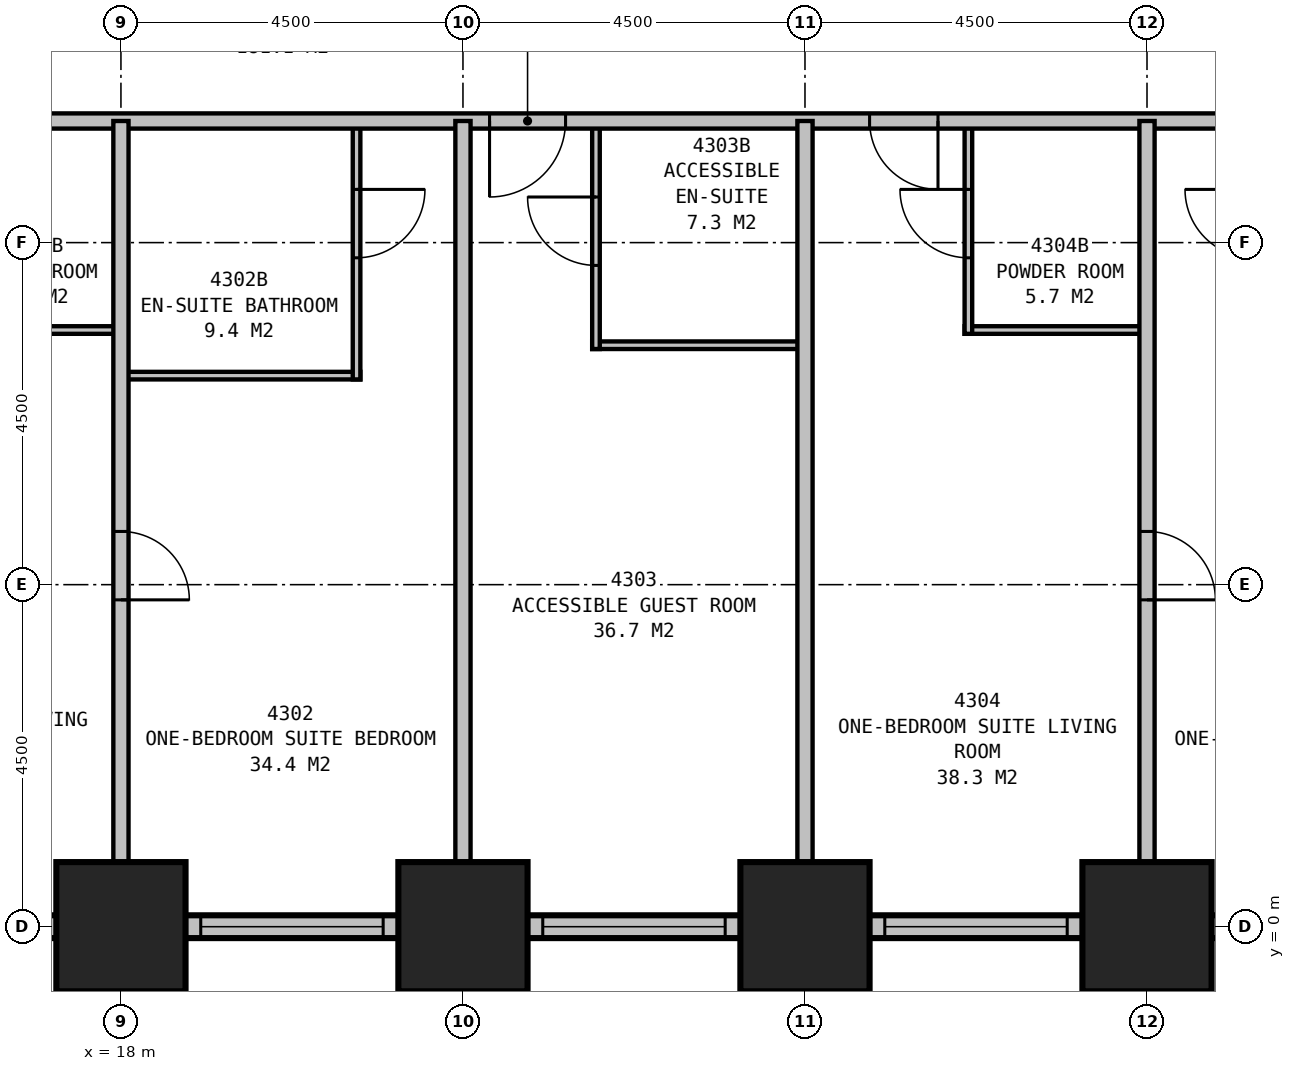
"""IFC4 building model, lengths in metres.
Left out: names, types, materials, properties, quantities, classifications, styles, units other than length and angle.
Written with IfcOpenShell. Run it as: python <this file> out.ifc"""

import sys

from ifc_helpers import new_model, si_unit, direction, frame, frame_2d, origin, origin_2d, place, context, subcontext, project, spatial, rectangle, extrude, element, fill, save


model = new_model("IFC4")
c1 = context("Model", 3, precision=1e-05, world=origin(), true_north=direction((0.0, 1.0)))
c2 = subcontext(c1, "Body", "Model", "MODEL_VIEW")
j1 = project(units=[si_unit("LENGTHUNIT", "METRE"), si_unit("PLANEANGLEUNIT", "RADIAN")], contexts=[c1])
p1 = place(None, origin())
s1 = spatial("IfcSite", under=j1, at=p1, CompositionType="ELEMENT")
p2 = place(p1, origin())
s2 = spatial("IfcBuilding", under=s1, at=p2, CompositionType="ELEMENT")
p3 = place(p2, frame((0.0, 0.0, 169.4)))
s3 = spatial("IfcBuildingStorey", under=s2, at=p3, CompositionType="ELEMENT", Elevation=169.4)
for number, where, z_axis, x_axis in (
    (1, (18.0, 0.0, 0.0), (0.0, 0.0, 1.0), (1.0, 0.0, 0.0)),
    (2, (22.5, 0.0, 0.0), (0.0, 0.0, 1.0), (1.0, 0.0, 0.0)),
    (3, (27.0, 0.0, 0.0), (0.0, 0.0, 1.0), (1.0, 0.0, 0.0)),
    (4, (31.5, 0.0, 0.0), (0.0, 0.0, 1.0), (1.0, 0.0, 0.0)),
):
    element("IfcColumn", number, at=place(p3, frame(where, z_axis=z_axis, x_axis=x_axis)), inside=s3, PredefinedType="COLUMN", context=c2, shape_type="SweptSolid", body=[
        extrude(rectangle(XDim=1.7, YDim=1.7, at=origin_2d()), origin(), (0.0, 0.0, 1.0), 3.5),
    ])
p4 = place(p3, frame((8.85, 0.0, 0.0), z_axis=(0.0, 0.0, 1.0), x_axis=(1.0, 0.0, 0.0)))
e5 = element("IfcWall", 5, at=p4, inside=s3, PredefinedType="STANDARD", context=c2, shape_type="SweptSolid", body=[
    extrude(rectangle(XDim=36.3, YDim=0.3, at=frame_2d((18.15, 0.0))), origin(), (0.0, 0.0, 1.0), 2.25),
])
p5 = place(p4, frame((1.2, 0.0, 0.5)))
e6 = element("IfcOpeningElement", 6, at=p5, cuts=e5, PredefinedType="OPENING", context=c2, shape_type="SweptSolid", body=[
    extrude(rectangle(XDim=2.4, YDim=1.6, at=frame_2d((1.2, 0.8))), frame((0.0, 0.16, 0.0), z_axis=(0.0, -1.0, 0.0), x_axis=(1.0, 0.0, 0.0)), (0.0, 0.0, 1.0), 0.32),
])
p6 = place(p4, frame((5.7, 0.0, 0.5)))
e7 = element("IfcOpeningElement", 7, at=p6, cuts=e5, PredefinedType="OPENING", context=c2, shape_type="SweptSolid", body=[
    extrude(rectangle(XDim=2.4, YDim=1.6, at=frame_2d((1.2, 0.8))), frame((0.0, 0.16, 0.0), z_axis=(0.0, -1.0, 0.0), x_axis=(1.0, 0.0, 0.0)), (0.0, 0.0, 1.0), 0.32),
])
p7 = place(p4, frame((10.2, 0.0, 0.5)))
e8 = element("IfcOpeningElement", 8, at=p7, cuts=e5, PredefinedType="OPENING", context=c2, shape_type="SweptSolid", body=[
    extrude(rectangle(XDim=2.4, YDim=1.6, at=frame_2d((1.2, 0.8))), frame((0.0, 0.16, 0.0), z_axis=(0.0, -1.0, 0.0), x_axis=(1.0, 0.0, 0.0)), (0.0, 0.0, 1.0), 0.32),
])
p8 = place(p4, frame((14.7, 0.0, 0.5)))
e9 = element("IfcOpeningElement", 9, at=p8, cuts=e5, PredefinedType="OPENING", context=c2, shape_type="SweptSolid", body=[
    extrude(rectangle(XDim=2.4, YDim=1.6, at=frame_2d((1.2, 0.8))), frame((0.0, 0.16, 0.0), z_axis=(0.0, -1.0, 0.0), x_axis=(1.0, 0.0, 0.0)), (0.0, 0.0, 1.0), 0.32),
])
p9 = place(p4, frame((19.2, 0.0, 0.5)))
e10 = element("IfcOpeningElement", 10, at=p9, cuts=e5, PredefinedType="OPENING", context=c2, shape_type="SweptSolid", body=[
    extrude(rectangle(XDim=2.4, YDim=1.6, at=frame_2d((1.2, 0.8))), frame((0.0, 0.16, 0.0), z_axis=(0.0, -1.0, 0.0), x_axis=(1.0, 0.0, 0.0)), (0.0, 0.0, 1.0), 0.32),
])
p10 = place(p4, frame((23.7, 0.0, 0.5)))
e11 = element("IfcOpeningElement", 11, at=p10, cuts=e5, PredefinedType="OPENING", context=c2, shape_type="SweptSolid", body=[
    extrude(rectangle(XDim=2.4, YDim=1.6, at=frame_2d((1.2, 0.8))), frame((0.0, 0.16, 0.0), z_axis=(0.0, -1.0, 0.0), x_axis=(1.0, 0.0, 0.0)), (0.0, 0.0, 1.0), 0.32),
])
p11 = place(p4, frame((28.2, 0.0, 0.5)))
e12 = element("IfcOpeningElement", 12, at=p11, cuts=e5, PredefinedType="OPENING", context=c2, shape_type="SweptSolid", body=[
    extrude(rectangle(XDim=2.4, YDim=1.6, at=frame_2d((1.2, 0.8))), frame((0.0, 0.16, 0.0), z_axis=(0.0, -1.0, 0.0), x_axis=(1.0, 0.0, 0.0)), (0.0, 0.0, 1.0), 0.32),
])
p12 = place(p4, frame((32.7, 0.0, 0.5)))
e13 = element("IfcOpeningElement", 13, at=p12, cuts=e5, PredefinedType="OPENING", context=c2, shape_type="SweptSolid", body=[
    extrude(rectangle(XDim=2.4, YDim=1.6, at=frame_2d((1.2, 0.8))), frame((0.0, 0.16, 0.0), z_axis=(0.0, -1.0, 0.0), x_axis=(1.0, 0.0, 0.0)), (0.0, 0.0, 1.0), 0.32),
])
p13 = place(p3, frame((11.2, 10.6, 0.0), z_axis=(0.0, 0.0, 1.0), x_axis=(1.0, 0.0, 0.0)))
e14 = element("IfcWall", 14, at=p13, inside=s3, PredefinedType="PARTITIONING", context=c2, shape_type="SweptSolid", body=[
    extrude(rectangle(XDim=27.1, YDim=0.2, at=frame_2d((13.55, 0.0))), origin(), (0.0, 0.0, 1.0), 3.25),
])
p14 = place(p13, frame((4.05, 0.0, 0.0), z_axis=(0.0, 0.0, 1.0), x_axis=(-1.0, 0.0, 0.0)))
e15 = element("IfcOpeningElement", 15, at=p14, cuts=e14, PredefinedType="OPENING", context=c2, shape_type="SweptSolid", body=[
    extrude(rectangle(XDim=0.9, YDim=2.1, at=frame_2d((0.45, 1.05))), frame((0.0, 0.11, 0.0), z_axis=(0.0, -1.0, 0.0), x_axis=(1.0, 0.0, 0.0)), (0.0, 0.0, 1.0), 0.22),
])
p15 = place(p13, frame((12.65, 0.0, 0.0), z_axis=(0.0, 0.0, 1.0), x_axis=(-1.0, 0.0, 0.0)))
e16 = element("IfcOpeningElement", 16, at=p15, cuts=e14, PredefinedType="OPENING", context=c2, shape_type="SweptSolid", body=[
    extrude(rectangle(XDim=1.0, YDim=2.1, at=frame_2d((0.5, 1.05))), frame((0.0, 0.11, 0.0), z_axis=(0.0, -1.0, 0.0), x_axis=(1.0, 0.0, 0.0)), (0.0, 0.0, 1.0), 0.22),
])
p16 = place(p13, frame((17.55, 0.0, 0.0), z_axis=(0.0, 0.0, 1.0), x_axis=(-1.0, 0.0, 0.0)))
e17 = element("IfcOpeningElement", 17, at=p16, cuts=e14, PredefinedType="OPENING", context=c2, shape_type="SweptSolid", body=[
    extrude(rectangle(XDim=0.9, YDim=2.1, at=frame_2d((0.45, 1.05))), frame((0.0, 0.11, 0.0), z_axis=(0.0, -1.0, 0.0), x_axis=(1.0, 0.0, 0.0)), (0.0, 0.0, 1.0), 0.22),
])
p17 = place(p13, frame((1.6, 0.0, 0.0), z_axis=(0.0, 0.0, 1.0), x_axis=(-1.0, 0.0, 0.0)))
e18 = element("IfcOpeningElement", 18, at=p17, cuts=e14, PredefinedType="OPENING", context=c2, shape_type="SweptSolid", body=[
    extrude(rectangle(XDim=0.9, YDim=2.1, at=frame_2d((0.45, 1.05))), frame((0.0, 0.11, 0.0), z_axis=(0.0, -1.0, 0.0), x_axis=(1.0, 0.0, 0.0)), (0.0, 0.0, 1.0), 0.22),
])
p18 = place(p13, frame((26.4, 0.0, 0.0), z_axis=(0.0, 0.0, 1.0), x_axis=(-1.0, 0.0, 0.0)))
e19 = element("IfcOpeningElement", 19, at=p18, cuts=e14, PredefinedType="OPENING", context=c2, shape_type="SweptSolid", body=[
    extrude(rectangle(XDim=0.9, YDim=2.1, at=frame_2d((0.45, 1.05))), frame((0.0, 0.11, 0.0), z_axis=(0.0, -1.0, 0.0), x_axis=(1.0, 0.0, 0.0)), (0.0, 0.0, 1.0), 0.22),
])
p19 = place(p3, frame((18.0, 10.6, 0.0), z_axis=(0.0, 0.0, 1.0), x_axis=(0.0, -1.0, 0.0)))
e20 = element("IfcWall", 20, at=p19, inside=s3, PredefinedType="PARTITIONING", context=c2, shape_type="SweptSolid", body=[
    extrude(rectangle(XDim=10.6, YDim=0.2, at=frame_2d((5.3, 0.0))), origin(), (0.0, 0.0, 1.0), 2.25),
])
p20 = place(p19, frame((5.4, 0.0, 0.0)))
e21 = element("IfcOpeningElement", 21, at=p20, cuts=e20, PredefinedType="OPENING", context=c2, shape_type="SweptSolid", body=[
    extrude(rectangle(XDim=0.9, YDim=2.1, at=frame_2d((0.45, 1.05))), frame((0.0, 0.11, 0.0), z_axis=(0.0, -1.0, 0.0), x_axis=(1.0, 0.0, 0.0)), (0.0, 0.0, 1.0), 0.22),
])
for number, where, z_axis, x_axis in (
    (22, (22.5, 10.6, 0.0), (0.0, 0.0, 1.0), (0.0, -1.0, 0.0)),
    (23, (27.0, 10.6, 0.0), (0.0, 0.0, 1.0), (0.0, -1.0, 0.0)),
):
    element("IfcWall", number, at=place(p3, frame(where, z_axis=z_axis, x_axis=x_axis)), inside=s3, PredefinedType="PARTITIONING", context=c2, shape_type="SweptSolid", body=[
        extrude(rectangle(XDim=10.6, YDim=0.2, at=frame_2d((5.3, 0.0))), origin(), (0.0, 0.0, 1.0), 2.25),
    ])
p21 = place(p3, frame((31.5, 10.6, 0.0), z_axis=(0.0, 0.0, 1.0), x_axis=(0.0, -1.0, 0.0)))
e24 = element("IfcWall", 24, at=p21, inside=s3, PredefinedType="PARTITIONING", context=c2, shape_type="SweptSolid", body=[
    extrude(rectangle(XDim=10.6, YDim=0.2, at=frame_2d((5.3, 0.0))), origin(), (0.0, 0.0, 1.0), 2.25),
])
p22 = place(p21, frame((5.4, 0.0, 0.0)))
e25 = element("IfcOpeningElement", 25, at=p22, cuts=e24, PredefinedType="OPENING", context=c2, shape_type="SweptSolid", body=[
    extrude(rectangle(XDim=0.9, YDim=2.1, at=frame_2d((0.45, 1.05))), frame((0.0, 0.11, 0.0), z_axis=(0.0, -1.0, 0.0), x_axis=(1.0, 0.0, 0.0)), (0.0, 0.0, 1.0), 0.22),
])
p23 = place(p3, frame((15.6, 7.85, 0.0), z_axis=(0.0, 0.0, 1.0), x_axis=(1.0, 0.0, 0.0)))
e26 = element("IfcWall", 26, at=p23, inside=s3, PredefinedType="PLUMBINGWALL", context=c2, shape_type="SweptSolid", body=[
    extrude(rectangle(XDim=2.4, YDim=0.1, at=frame_2d((1.2, 0.0))), origin(), (0.0, 0.0, 1.0), 3.25),
])
p24 = place(p3, frame((18.0, 7.25, 0.0), z_axis=(0.0, 0.0, 1.0), x_axis=(1.0, 0.0, 0.0)))
e27 = element("IfcWall", 27, at=p24, inside=s3, PredefinedType="PLUMBINGWALL", context=c2, shape_type="SweptSolid", body=[
    extrude(rectangle(XDim=3.15, YDim=0.1, at=frame_2d((1.575, 0.0))), origin(), (0.0, 0.0, 1.0), 3.25),
])
p25 = place(p3, frame((21.1, 10.6, 0.0), z_axis=(0.0, 0.0, 1.0), x_axis=(0.0, -1.0, 0.0)))
e28 = element("IfcWall", 28, at=p25, inside=s3, PredefinedType="PLUMBINGWALL", context=c2, shape_type="SweptSolid", body=[
    extrude(rectangle(XDim=3.4, YDim=0.1, at=frame_2d((1.7, 0.0))), origin(), (0.0, 0.0, 1.0), 3.25),
])
p26 = place(p25, frame((0.9, 0.0, 0.0)))
e29 = element("IfcOpeningElement", 29, at=p26, cuts=e28, PredefinedType="OPENING", context=c2, shape_type="SweptSolid", body=[
    extrude(rectangle(XDim=0.9, YDim=2.1, at=frame_2d((0.45, 1.05))), frame((0.0, 0.06, 0.0), z_axis=(0.0, -1.0, 0.0), x_axis=(1.0, 0.0, 0.0)), (0.0, 0.0, 1.0), 0.12),
])
p27 = place(p3, frame((24.2, 7.65, 0.0), z_axis=(0.0, 0.0, 1.0), x_axis=(1.0, 0.0, 0.0)))
e30 = element("IfcWall", 30, at=p27, inside=s3, PredefinedType="PLUMBINGWALL", context=c2, shape_type="SweptSolid", body=[
    extrude(rectangle(XDim=2.8, YDim=0.1, at=frame_2d((1.4, 0.0))), origin(), (0.0, 0.0, 1.0), 3.25),
])
p28 = place(p3, frame((24.25, 10.6, 0.0), z_axis=(0.0, 0.0, 1.0), x_axis=(0.0, -1.0, 0.0)))
e31 = element("IfcWall", 31, at=p28, inside=s3, PredefinedType="PLUMBINGWALL", context=c2, shape_type="SweptSolid", body=[
    extrude(rectangle(XDim=3.0, YDim=0.1, at=frame_2d((1.5, 0.0))), origin(), (0.0, 0.0, 1.0), 3.25),
])
p29 = place(p28, frame((1.9, 0.0, 0.0), z_axis=(0.0, 0.0, 1.0), x_axis=(-1.0, 0.0, 0.0)))
e32 = element("IfcOpeningElement", 32, at=p29, cuts=e31, PredefinedType="OPENING", context=c2, shape_type="SweptSolid", body=[
    extrude(rectangle(XDim=0.9, YDim=2.1, at=frame_2d((0.45, 1.05))), frame((0.0, 0.06, 0.0), z_axis=(0.0, -1.0, 0.0), x_axis=(1.0, 0.0, 0.0)), (0.0, 0.0, 1.0), 0.12),
])
p30 = place(p3, frame((29.1, 7.85, 0.0), z_axis=(0.0, 0.0, 1.0), x_axis=(1.0, 0.0, 0.0)))
e33 = element("IfcWall", 33, at=p30, inside=s3, PredefinedType="PLUMBINGWALL", context=c2, shape_type="SweptSolid", body=[
    extrude(rectangle(XDim=2.4, YDim=0.1, at=frame_2d((1.2, 0.0))), origin(), (0.0, 0.0, 1.0), 3.25),
])
p31 = place(p3, frame((29.15, 10.6, 0.0), z_axis=(0.0, 0.0, 1.0), x_axis=(0.0, -1.0, 0.0)))
e34 = element("IfcWall", 34, at=p31, inside=s3, PredefinedType="PLUMBINGWALL", context=c2, shape_type="SweptSolid", body=[
    extrude(rectangle(XDim=2.8, YDim=0.1, at=frame_2d((1.4, 0.0))), origin(), (0.0, 0.0, 1.0), 3.25),
])
p32 = place(p31, frame((1.8, 0.0, 0.0), z_axis=(0.0, 0.0, 1.0), x_axis=(-1.0, 0.0, 0.0)))
e35 = element("IfcOpeningElement", 35, at=p32, cuts=e34, PredefinedType="OPENING", context=c2, shape_type="SweptSolid", body=[
    extrude(rectangle(XDim=0.9, YDim=2.1, at=frame_2d((0.45, 1.05))), frame((0.0, 0.06, 0.0), z_axis=(0.0, -1.0, 0.0), x_axis=(1.0, 0.0, 0.0)), (0.0, 0.0, 1.0), 0.12),
])
p33 = place(p7, origin())
e36 = element("IfcWindow", 36, at=p33, inside=s3, PartitioningType="SINGLE_PANEL", PredefinedType="WINDOW", context=c2, shape_type="SweptSolid", body=[
    extrude(rectangle(XDim=2.4, YDim=1.6, at=frame_2d((1.2, 0.8))), frame((0.0, 0.03, 0.0), z_axis=(0.0, -1.0, 0.0), x_axis=(1.0, 0.0, 0.0)), (0.0, 0.0, 1.0), 0.06),
])
fill(e8, e36)
p34 = place(p8, origin())
e37 = element("IfcWindow", 37, at=p34, inside=s3, PartitioningType="SINGLE_PANEL", PredefinedType="WINDOW", context=c2, shape_type="SweptSolid", body=[
    extrude(rectangle(XDim=2.4, YDim=1.6, at=frame_2d((1.2, 0.8))), frame((0.0, 0.03, 0.0), z_axis=(0.0, -1.0, 0.0), x_axis=(1.0, 0.0, 0.0)), (0.0, 0.0, 1.0), 0.06),
])
fill(e9, e37)
p35 = place(p9, origin())
e38 = element("IfcWindow", 38, at=p35, inside=s3, PartitioningType="SINGLE_PANEL", PredefinedType="WINDOW", context=c2, shape_type="SweptSolid", body=[
    extrude(rectangle(XDim=2.4, YDim=1.6, at=frame_2d((1.2, 0.8))), frame((0.0, 0.03, 0.0), z_axis=(0.0, -1.0, 0.0), x_axis=(1.0, 0.0, 0.0)), (0.0, 0.0, 1.0), 0.06),
])
fill(e10, e38)
p36 = place(p15, origin())
e39 = element("IfcDoor", 39, at=p36, inside=s3, OperationType="SINGLE_SWING_RIGHT", PredefinedType="DOOR", context=c2, shape_type="SweptSolid", body=[
    extrude(rectangle(XDim=1.0, YDim=2.1, at=frame_2d((0.5, 1.05))), frame((0.0, 0.025, 0.0), z_axis=(0.0, -1.0, 0.0), x_axis=(1.0, 0.0, 0.0)), (0.0, 0.0, 1.0), 0.05),
])
fill(e16, e39)
p37 = place(p16, origin())
e40 = element("IfcDoor", 40, at=p37, inside=s3, OperationType="SINGLE_SWING_LEFT", PredefinedType="DOOR", context=c2, shape_type="SweptSolid", body=[
    extrude(rectangle(XDim=0.9, YDim=2.1, at=frame_2d((0.45, 1.05))), frame((0.0, 0.025, 0.0), z_axis=(0.0, -1.0, 0.0), x_axis=(1.0, 0.0, 0.0)), (0.0, 0.0, 1.0), 0.05),
])
fill(e17, e40)
p38 = place(p20, origin())
e41 = element("IfcDoor", 41, at=p38, inside=s3, OperationType="SINGLE_SWING_RIGHT", PredefinedType="DOOR", context=c2, shape_type="SweptSolid", body=[
    extrude(rectangle(XDim=0.9, YDim=2.1, at=frame_2d((0.45, 1.05))), frame((0.0, 0.025, 0.0), z_axis=(0.0, -1.0, 0.0), x_axis=(1.0, 0.0, 0.0)), (0.0, 0.0, 1.0), 0.05),
])
fill(e21, e41)
p39 = place(p22, origin())
e42 = element("IfcDoor", 42, at=p39, inside=s3, OperationType="SINGLE_SWING_RIGHT", PredefinedType="DOOR", context=c2, shape_type="SweptSolid", body=[
    extrude(rectangle(XDim=0.9, YDim=2.1, at=frame_2d((0.45, 1.05))), frame((0.0, 0.025, 0.0), z_axis=(0.0, -1.0, 0.0), x_axis=(1.0, 0.0, 0.0)), (0.0, 0.0, 1.0), 0.05),
])
fill(e25, e42)
p40 = place(p26, origin())
e43 = element("IfcDoor", 43, at=p40, inside=s3, OperationType="SINGLE_SWING_LEFT", PredefinedType="DOOR", context=c2, shape_type="SweptSolid", body=[
    extrude(rectangle(XDim=0.9, YDim=2.1, at=frame_2d((0.45, 1.05))), frame((0.0, 0.025, 0.0), z_axis=(0.0, -1.0, 0.0), x_axis=(1.0, 0.0, 0.0)), (0.0, 0.0, 1.0), 0.05),
])
fill(e29, e43)
p41 = place(p29, origin())
e44 = element("IfcDoor", 44, at=p41, inside=s3, OperationType="SINGLE_SWING_RIGHT", PredefinedType="DOOR", context=c2, shape_type="SweptSolid", body=[
    extrude(rectangle(XDim=0.9, YDim=2.1, at=frame_2d((0.45, 1.05))), frame((0.0, 0.025, 0.0), z_axis=(0.0, -1.0, 0.0), x_axis=(1.0, 0.0, 0.0)), (0.0, 0.0, 1.0), 0.05),
])
fill(e32, e44)
p42 = place(p32, origin())
e45 = element("IfcDoor", 45, at=p42, inside=s3, OperationType="SINGLE_SWING_RIGHT", PredefinedType="DOOR", context=c2, shape_type="SweptSolid", body=[
    extrude(rectangle(XDim=0.9, YDim=2.1, at=frame_2d((0.45, 1.05))), frame((0.0, 0.025, 0.0), z_axis=(0.0, -1.0, 0.0), x_axis=(1.0, 0.0, 0.0)), (0.0, 0.0, 1.0), 0.05),
])
fill(e35, e45)
save(model, sys.argv[1])
